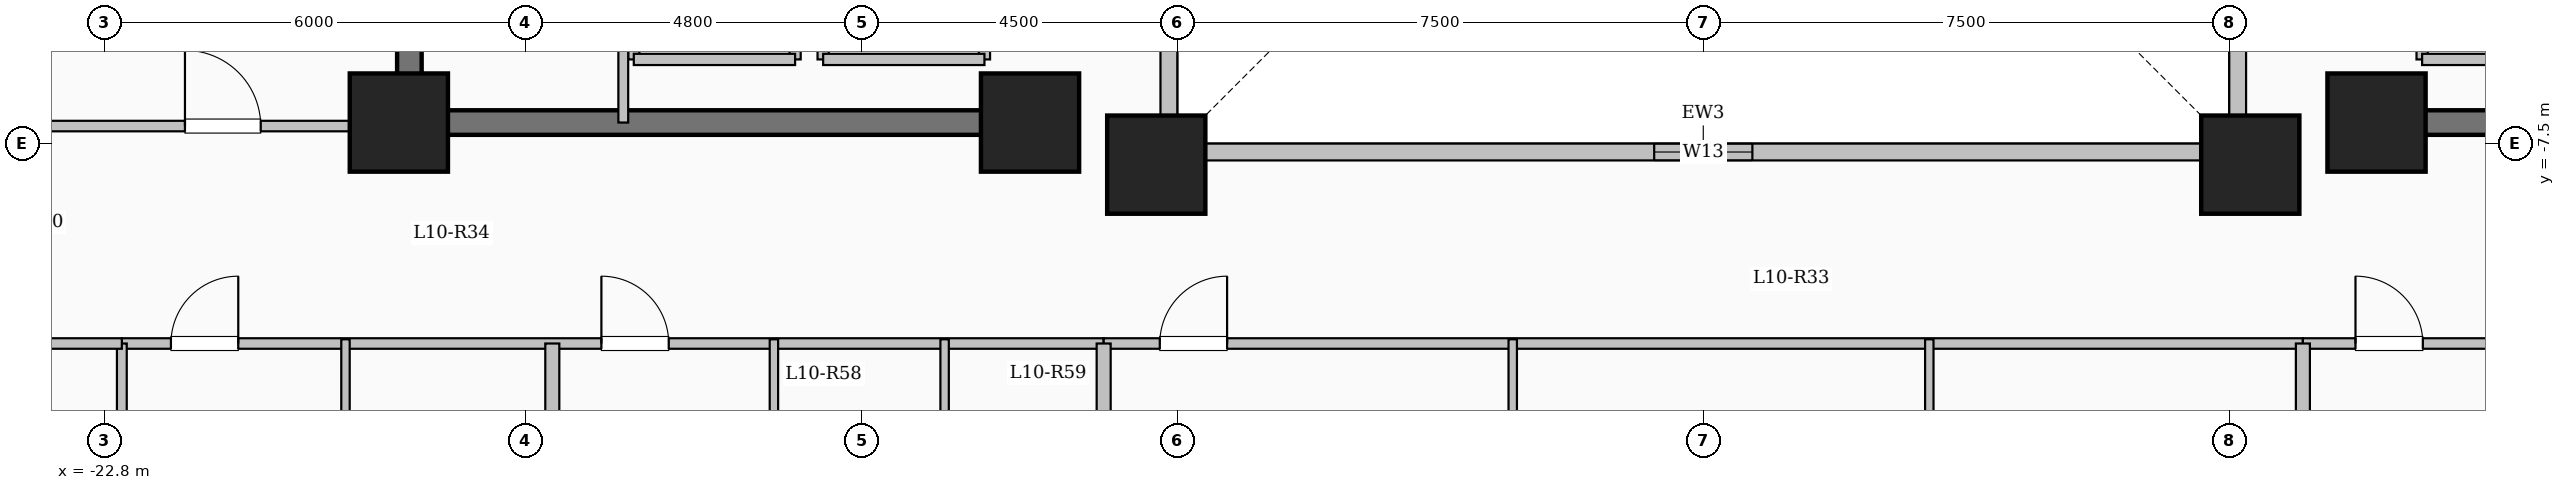
"""IFC4 building model, lengths in metres.
Left out: names, types, materials, properties, quantities, classifications, styles, units other than length and angle.
Written with IfcOpenShell. Run it as: python <this file> out.ifc"""

import sys

from ifc_helpers import new_model, si_unit, direction, frame, frame_2d, origin, origin_2d, place, context, subcontext, project, spatial, rectangle, extrude, element, fill, save


model = new_model("IFC4")
c1 = context("Model", 3, precision=1e-05, world=origin(), true_north=direction((0.0, 1.0)))
c2 = subcontext(c1, "Body", "Model", "MODEL_VIEW")
j1 = project(units=[si_unit("LENGTHUNIT", "METRE"), si_unit("PLANEANGLEUNIT", "RADIAN")], contexts=[c1])
p1 = place(None, origin())
s1 = spatial("IfcSite", under=j1, at=p1, CompositionType="ELEMENT")
p2 = place(p1, origin())
s2 = spatial("IfcBuilding", under=s1, at=p2, CompositionType="ELEMENT")
p3 = place(p2, frame((0.0, 0.0, 40.75)))
s3 = spatial("IfcBuildingStorey", under=s2, at=p3, CompositionType="ELEMENT", Elevation=40.75)
for number, where, z_axis, x_axis in (
    (1, (-7.8, -7.8, 0.0), (0.0, 0.0, 1.0), (1.0, 0.0, 0.0)),
    (2, (7.8, -7.8, 0.0), (0.0, 0.0, 1.0), (1.0, 0.0, 0.0)),
    (3, (-9.6, -7.2, 0.0), (0.0, 0.0, 1.0), (1.0, 0.0, 0.0)),
    (4, (9.6, -7.2, 0.0), (0.0, 0.0, 1.0), (1.0, 0.0, 0.0)),
    (5, (-18.6, -7.2, 0.0), (0.0, 0.0, 1.0), (1.0, 0.0, 0.0)),
):
    element("IfcColumn", number, at=place(p3, frame(where, z_axis=z_axis, x_axis=x_axis)), inside=s3, PredefinedType="COLUMN", context=c2, shape_type="SweptSolid", body=[
        extrude(rectangle(XDim=1.4, YDim=1.4, at=origin_2d()), origin(), (0.0, 0.0, 1.0), 3.35),
    ])
p4 = place(p3, frame((-7.62, -7.62, 0.0), z_axis=(0.0, 0.0, 1.0), x_axis=(1.0, 0.0, 0.0)))
e6 = element("IfcWall", 6, at=p4, inside=s3, PredefinedType="SOLIDWALL", context=c2, shape_type="SweptSolid", body=[
    extrude(rectangle(XDim=15.24, YDim=0.24, at=frame_2d((7.62, 0.0))), origin(), (0.0, 0.0, 1.0), 3.1),
])
p5 = place(p4, frame((6.92, 0.0, 0.95)))
e7 = element("IfcOpeningElement", 7, at=p5, cuts=e6, PredefinedType="OPENING", context=c2, shape_type="SweptSolid", body=[
    extrude(rectangle(XDim=1.4, YDim=1.5, at=frame_2d((0.7, 0.75))), frame((0.0, 0.13, 0.0), z_axis=(0.0, -1.0, 0.0), x_axis=(1.0, 0.0, 0.0)), (0.0, 0.0, 1.0), 0.26),
])
p6 = place(p3, frame((7.62, -7.62, 0.0), z_axis=(0.0, 0.0, 1.0), x_axis=(0.0, 1.0, 0.0)))
e8 = element("IfcWall", 8, at=p6, inside=s3, PredefinedType="SOLIDWALL", context=c2, shape_type="SweptSolid", body=[
    extrude(rectangle(XDim=15.24, YDim=0.24, at=frame_2d((7.62, 0.0))), origin(), (0.0, 0.0, 1.0), 3.1),
])
p7 = place(p6, frame((6.92, 0.0, 0.95)))
e9 = element("IfcOpeningElement", 9, at=p7, cuts=e8, PredefinedType="OPENING", context=c2, shape_type="SweptSolid", body=[
    extrude(rectangle(XDim=1.4, YDim=1.5, at=frame_2d((0.7, 0.75))), frame((0.0, 0.13, 0.0), z_axis=(0.0, -1.0, 0.0), x_axis=(1.0, 0.0, 0.0)), (0.0, 0.0, 1.0), 0.26),
])
p8 = place(p3, frame((-7.62, 7.62, 0.0), z_axis=(0.0, 0.0, 1.0), x_axis=(0.0, -1.0, 0.0)))
e10 = element("IfcWall", 10, at=p8, inside=s3, PredefinedType="SOLIDWALL", context=c2, shape_type="SweptSolid", body=[
    extrude(rectangle(XDim=15.24, YDim=0.24, at=frame_2d((7.62, 0.0))), origin(), (0.0, 0.0, 1.0), 3.1),
])
p9 = place(p8, frame((6.92, 0.0, 0.95)))
e11 = element("IfcOpeningElement", 11, at=p9, cuts=e10, PredefinedType="OPENING", context=c2, shape_type="SweptSolid", body=[
    extrude(rectangle(XDim=1.4, YDim=1.5, at=frame_2d((0.7, 0.75))), frame((0.0, 0.13, 0.0), z_axis=(0.0, -1.0, 0.0), x_axis=(1.0, 0.0, 0.0)), (0.0, 0.0, 1.0), 0.26),
])
p10 = place(p3, frame((-12.55, -6.3, 0.0), z_axis=(0.0, 0.0, 1.0), x_axis=(0.0, 1.0, 0.0)))
e12 = element("IfcWall", 12, at=p10, inside=s3, PredefinedType="SOLIDWALL", context=c2, shape_type="SweptSolid", body=[
    extrude(rectangle(XDim=2.6, YDim=0.16, at=frame_2d((1.3, 0.0))), origin(), (0.0, 0.0, 1.0), 3.1),
])
p11 = place(p3, frame((-10.25, -6.3, 0.0), z_axis=(0.0, 0.0, 1.0), x_axis=(0.0, 1.0, 0.0)))
e13 = element("IfcWall", 13, at=p11, inside=s3, PredefinedType="SOLIDWALL", context=c2, shape_type="SweptSolid", body=[
    extrude(rectangle(XDim=2.6, YDim=0.16, at=frame_2d((1.3, 0.0))), origin(), (0.0, 0.0, 1.0), 3.1),
])
p12 = place(p11, frame((0.75, 0.0, 0.0)))
e14 = element("IfcOpeningElement", 14, at=p12, cuts=e13, PredefinedType="OPENING", context=c2, shape_type="SweptSolid", body=[
    extrude(rectangle(XDim=1.1, YDim=2.15, at=frame_2d((0.55, 1.075))), frame((0.0, 0.09, 0.0), z_axis=(0.0, -1.0, 0.0), x_axis=(1.0, 0.0, 0.0)), (0.0, 0.0, 1.0), 0.18),
])
p13 = place(p3, frame((-12.55, -6.3, 0.0), z_axis=(0.0, 0.0, 1.0), x_axis=(1.0, 0.0, 0.0)))
e15 = element("IfcWall", 15, at=p13, inside=s3, PredefinedType="SOLIDWALL", context=c2, shape_type="SweptSolid", body=[
    extrude(rectangle(XDim=2.3, YDim=0.16, at=frame_2d((1.15, 0.0))), origin(), (0.0, 0.0, 1.0), 3.1),
])
for number, where, z_axis, x_axis in (
    (16, (-15.25, -6.3, 0.0), (0.0, 0.0, 1.0), (0.0, 1.0, 0.0)),
    (17, (-12.95, -6.3, 0.0), (0.0, 0.0, 1.0), (0.0, 1.0, 0.0)),
):
    element("IfcWall", number, at=place(p3, frame(where, z_axis=z_axis, x_axis=x_axis)), inside=s3, PredefinedType="SOLIDWALL", context=c2, shape_type="SweptSolid", body=[
        extrude(rectangle(XDim=2.6, YDim=0.16, at=frame_2d((1.3, 0.0))), origin(), (0.0, 0.0, 1.0), 3.1),
    ])
p14 = place(p3, frame((-15.25, -6.3, 0.0), z_axis=(0.0, 0.0, 1.0), x_axis=(1.0, 0.0, 0.0)))
e18 = element("IfcWall", 18, at=p14, inside=s3, PredefinedType="SOLIDWALL", context=c2, shape_type="SweptSolid", body=[
    extrude(rectangle(XDim=2.3, YDim=0.16, at=frame_2d((1.15, 0.0))), origin(), (0.0, 0.0, 1.0), 3.1),
])
p15 = place(p3, frame((10.25, -6.3, 0.0), z_axis=(0.0, 0.0, 1.0), x_axis=(0.0, 1.0, 0.0)))
e19 = element("IfcWall", 19, at=p15, inside=s3, PredefinedType="SOLIDWALL", context=c2, shape_type="SweptSolid", body=[
    extrude(rectangle(XDim=2.6, YDim=0.16, at=frame_2d((1.3, 0.0))), origin(), (0.0, 0.0, 1.0), 3.1),
])
p16 = place(p3, frame((10.25, -6.3, 0.0), z_axis=(0.0, 0.0, 1.0), x_axis=(1.0, 0.0, 0.0)))
e20 = element("IfcWall", 20, at=p16, inside=s3, PredefinedType="SOLIDWALL", context=c2, shape_type="SweptSolid", body=[
    extrude(rectangle(XDim=2.3, YDim=0.16, at=frame_2d((1.15, 0.0))), origin(), (0.0, 0.0, 1.0), 3.1),
])
p17 = place(p3, frame((-18.45, -7.375, 0.0), z_axis=(0.0, 0.0, 1.0), x_axis=(0.0, 1.0, 0.0)))
e21 = element("IfcWall", 21, at=p17, inside=s3, PredefinedType="SHEAR", context=c2, shape_type="SweptSolid", body=[
    extrude(rectangle(XDim=14.05, YDim=0.35, at=frame_2d((7.025, 0.0))), origin(), (0.0, 0.0, 1.0), 3.35),
])
for number, where, z_axis, x_axis in (
    (22, (-18.625, -7.2, 0.0), (0.0, 0.0, 1.0), (1.0, 0.0, 0.0)),
    (23, (10.075, -7.2, 0.0), (0.0, 0.0, 1.0), (1.0, 0.0, 0.0)),
):
    element("IfcWall", number, at=place(p3, frame(where, z_axis=z_axis, x_axis=x_axis)), inside=s3, PredefinedType="SHEAR", context=c2, shape_type="SweptSolid", body=[
        extrude(rectangle(XDim=8.55, YDim=0.35, at=frame_2d((4.275, 0.0))), origin(), (0.0, 0.0, 1.0), 3.35),
    ])
p18 = place(p3, frame((-15.4, -7.2, 0.0), z_axis=(0.0, 0.0, 1.0), x_axis=(0.0, 1.0, 0.0)))
e24 = element("IfcWall", 24, at=p18, inside=s3, PredefinedType="PARTITIONING", context=c2, shape_type="SweptSolid", body=[
    extrude(rectangle(XDim=10.45, YDim=0.14, at=frame_2d((5.225, 0.0))), origin(), (0.0, 0.0, 1.0), 3.1),
])
p19 = place(p18, frame((9.25, 0.0, 0.0)))
e25 = element("IfcOpeningElement", 25, at=p19, cuts=e24, PredefinedType="OPENING", context=c2, shape_type="SweptSolid", body=[
    extrude(rectangle(XDim=0.9, YDim=2.08, at=frame_2d((0.45, 1.04))), frame((0.0, 0.08, 0.0), z_axis=(0.0, -1.0, 0.0), x_axis=(1.0, 0.0, 0.0)), (0.0, 0.0, 1.0), 0.16),
])
p20 = place(p3, frame((-22.55, -10.35, 0.0), z_axis=(0.0, 0.0, 1.0), x_axis=(1.0, 0.0, 0.0)))
e26 = element("IfcWall", 26, at=p20, inside=s3, PredefinedType="PARTITIONING", context=c2, shape_type="SweptSolid", body=[
    extrude(rectangle(XDim=14.0, YDim=0.15, at=frame_2d((7.0, 0.0))), origin(), (0.0, 0.0, 1.0), 3.1),
])
p21 = place(p20, frame((0.7, 0.0, 0.0)))
e27 = element("IfcOpeningElement", 27, at=p21, cuts=e26, PredefinedType="OPENING", context=c2, shape_type="SweptSolid", body=[
    extrude(rectangle(XDim=0.96, YDim=2.15, at=frame_2d((0.48, 1.075))), frame((0.0, 0.085, 0.0), z_axis=(0.0, -1.0, 0.0), x_axis=(1.0, 0.0, 0.0)), (0.0, 0.0, 1.0), 0.17),
])
p22 = place(p20, frame((6.838, 0.0, 0.0)))
e28 = element("IfcOpeningElement", 28, at=p22, cuts=e26, PredefinedType="OPENING", context=c2, shape_type="SweptSolid", body=[
    extrude(rectangle(XDim=0.96, YDim=2.15, at=frame_2d((0.48, 1.075))), frame((0.0, 0.085, 0.0), z_axis=(0.0, -1.0, 0.0), x_axis=(1.0, 0.0, 0.0)), (0.0, 0.0, 1.0), 0.17),
])
p23 = place(p3, frame((-8.55, -10.35, 0.0), z_axis=(0.0, 0.0, 1.0), x_axis=(1.0, 0.0, 0.0)))
e29 = element("IfcWall", 29, at=p23, inside=s3, PredefinedType="PARTITIONING", context=c2, shape_type="SweptSolid", body=[
    extrude(rectangle(XDim=17.1, YDim=0.15, at=frame_2d((8.55, 0.0))), origin(), (0.0, 0.0, 1.0), 3.1),
])
p24 = place(p23, frame((0.8, 0.0, 0.0)))
e30 = element("IfcOpeningElement", 30, at=p24, cuts=e29, PredefinedType="OPENING", context=c2, shape_type="SweptSolid", body=[
    extrude(rectangle(XDim=0.96, YDim=2.15, at=frame_2d((0.48, 1.075))), frame((0.0, 0.085, 0.0), z_axis=(0.0, -1.0, 0.0), x_axis=(1.0, 0.0, 0.0)), (0.0, 0.0, 1.0), 0.17),
])
p25 = place(p3, frame((8.55, -10.35, 0.0), z_axis=(0.0, 0.0, 1.0), x_axis=(1.0, 0.0, 0.0)))
e31 = element("IfcWall", 31, at=p25, inside=s3, PredefinedType="PARTITIONING", context=c2, shape_type="SweptSolid", body=[
    extrude(rectangle(XDim=14.0, YDim=0.15, at=frame_2d((7.0, 0.0))), origin(), (0.0, 0.0, 1.0), 3.1),
])
p26 = place(p25, frame((0.75, 0.0, 0.0)))
e32 = element("IfcOpeningElement", 32, at=p26, cuts=e31, PredefinedType="OPENING", context=c2, shape_type="SweptSolid", body=[
    extrude(rectangle(XDim=0.96, YDim=2.15, at=frame_2d((0.48, 1.075))), frame((0.0, 0.085, 0.0), z_axis=(0.0, -1.0, 0.0), x_axis=(1.0, 0.0, 0.0)), (0.0, 0.0, 1.0), 0.17),
])
p27 = place(p25, frame((8.283, 0.0, 0.0)))
e33 = element("IfcOpeningElement", 33, at=p27, cuts=e31, PredefinedType="OPENING", context=c2, shape_type="SweptSolid", body=[
    extrude(rectangle(XDim=0.96, YDim=2.15, at=frame_2d((0.48, 1.075))), frame((0.0, 0.085, 0.0), z_axis=(0.0, -1.0, 0.0), x_axis=(1.0, 0.0, 0.0)), (0.0, 0.0, 1.0), 0.17),
])
p28 = place(p3, frame((-16.412, -23.6, 0.0), z_axis=(0.0, 0.0, 1.0), x_axis=(0.0, 1.0, 0.0)))
e34 = element("IfcWall", 34, at=p28, inside=s3, PredefinedType="SOLIDWALL", context=c2, shape_type="SweptSolid", body=[
    extrude(rectangle(XDim=13.25, YDim=0.2, at=frame_2d((6.625, 0.0))), origin(), (0.0, 0.0, 1.0), 3.1),
])
p29 = place(p3, frame((-19.361, -13.51, 0.0), z_axis=(0.0, 0.0, 1.0), x_axis=(0.0, 1.0, 0.0)))
e35 = element("IfcWall", 35, at=p29, inside=s3, PredefinedType="PARTITIONING", context=c2, shape_type="SweptSolid", body=[
    extrude(rectangle(XDim=3.22, YDim=0.12, at=frame_2d((1.61, 0.0))), origin(), (0.0, 0.0, 1.0), 3.1),
])
p30 = place(p29, frame((1.14, 0.0, 0.0)))
e36 = element("IfcOpeningElement", 36, at=p30, cuts=e35, PredefinedType="OPENING", context=c2, shape_type="SweptSolid", body=[
    extrude(rectangle(XDim=0.88, YDim=2.1, at=frame_2d((0.44, 1.05))), frame((0.0, 0.07, 0.0), z_axis=(0.0, -1.0, 0.0), x_axis=(1.0, 0.0, 0.0)), (0.0, 0.0, 1.0), 0.14),
])
p31 = place(p3, frame((-13.252, -23.6, 0.0), z_axis=(0.0, 0.0, 1.0), x_axis=(0.0, 1.0, 0.0)))
e37 = element("IfcWall", 37, at=p31, inside=s3, PredefinedType="PARTITIONING", context=c2, shape_type="SweptSolid", body=[
    extrude(rectangle(XDim=13.31, YDim=0.12, at=frame_2d((6.655, 0.0))), origin(), (0.0, 0.0, 1.0), 3.1),
])
p32 = place(p31, frame((9.485, 0.0, 0.0)))
e38 = element("IfcOpeningElement", 38, at=p32, cuts=e37, PredefinedType="OPENING", context=c2, shape_type="SweptSolid", body=[
    extrude(rectangle(XDim=1.08, YDim=2.15, at=frame_2d((0.54, 1.075))), frame((0.0, 0.07, 0.0), z_axis=(0.0, -1.0, 0.0), x_axis=(1.0, 0.0, 0.0)), (0.0, 0.0, 1.0), 0.14),
])
p33 = place(p3, frame((-10.818, -12.75, 0.0), z_axis=(0.0, 0.0, 1.0), x_axis=(0.0, 1.0, 0.0)))
e39 = element("IfcWall", 39, at=p33, inside=s3, PredefinedType="PARTITIONING", context=c2, shape_type="SweptSolid", body=[
    extrude(rectangle(XDim=2.46, YDim=0.12, at=frame_2d((1.23, 0.0))), origin(), (0.0, 0.0, 1.0), 3.1),
])
for number, where, z_axis, x_axis in (
    (40, (-8.55, -24.204, 0.0), (0.0, 0.0, 1.0), (0.0, 1.0, 0.0)),
    (41, (8.55, -24.204, 0.0), (0.0, 0.0, 1.0), (0.0, 1.0, 0.0)),
):
    element("IfcWall", number, at=place(p3, frame(where, z_axis=z_axis, x_axis=x_axis)), inside=s3, PredefinedType="SOLIDWALL", context=c2, shape_type="SweptSolid", body=[
        extrude(rectangle(XDim=13.854, YDim=0.2, at=frame_2d((6.927, 0.0))), origin(), (0.0, 0.0, 1.0), 3.1),
    ])
p34 = place(p3, frame((-2.717, -25.08, 0.0), z_axis=(0.0, 0.0, 1.0), x_axis=(0.0, 1.0, 0.0)))
e42 = element("IfcWall", 42, at=p34, inside=s3, PredefinedType="PARTITIONING", context=c2, shape_type="SweptSolid", body=[
    extrude(rectangle(XDim=14.79, YDim=0.12, at=frame_2d((7.395, 0.0))), origin(), (0.0, 0.0, 1.0), 3.1),
])
p35 = place(p34, frame((10.455, 0.0, 0.0)))
e43 = element("IfcOpeningElement", 43, at=p35, cuts=e42, PredefinedType="OPENING", context=c2, shape_type="SweptSolid", body=[
    extrude(rectangle(XDim=1.08, YDim=2.15, at=frame_2d((0.54, 1.075))), frame((0.0, 0.07, 0.0), z_axis=(0.0, -1.0, 0.0), x_axis=(1.0, 0.0, 0.0)), (0.0, 0.0, 1.0), 0.14),
])
p36 = place(p3, frame((3.223, -13.26, 0.0), z_axis=(0.0, 0.0, 1.0), x_axis=(0.0, 1.0, 0.0)))
e44 = element("IfcWall", 44, at=p36, inside=s3, PredefinedType="PARTITIONING", context=c2, shape_type="SweptSolid", body=[
    extrude(rectangle(XDim=2.97, YDim=0.12, at=frame_2d((1.485, 0.0))), origin(), (0.0, 0.0, 1.0), 3.1),
])
p37 = place(p3, frame((-28.68, -7.25, 0.0), z_axis=(0.0, 0.0, 1.0), x_axis=(1.0, 0.0, 0.0)))
e45 = element("IfcWall", 45, at=p37, inside=s3, PredefinedType="PARTITIONING", context=c2, shape_type="SweptSolid", body=[
    extrude(rectangle(XDim=10.23, YDim=0.15, at=frame_2d((5.115, 0.0))), origin(), (0.0, 0.0, 1.0), 3.1),
])
p38 = place(p37, frame((7.03, 0.0, 0.0)))
e46 = element("IfcOpeningElement", 46, at=p38, cuts=e45, PredefinedType="OPENING", context=c2, shape_type="SweptSolid", body=[
    extrude(rectangle(XDim=1.08, YDim=2.15, at=frame_2d((0.54, 1.075))), frame((0.0, 0.085, 0.0), z_axis=(0.0, -1.0, 0.0), x_axis=(1.0, 0.0, 0.0)), (0.0, 0.0, 1.0), 0.17),
])
p39 = place(p3, frame((-22.55, -19.05, 0.0), z_axis=(0.0, 0.0, 1.0), x_axis=(0.0, 1.0, 0.0)))
e47 = element("IfcWall", 47, at=p39, inside=s3, PredefinedType="PARTITIONING", context=c2, shape_type="SweptSolid", body=[
    extrude(rectangle(XDim=8.7, YDim=0.14, at=frame_2d((4.35, 0.0))), origin(), (0.0, 0.0, 1.0), 3.1),
])
p40 = place(p3, frame((-28.68, -10.35, 0.0), z_axis=(0.0, 0.0, 1.0), x_axis=(1.0, 0.0, 0.0)))
e48 = element("IfcWall", 48, at=p40, inside=s3, PredefinedType="PARTITIONING", context=c2, shape_type="SweptSolid", body=[
    extrude(rectangle(XDim=6.13, YDim=0.15, at=frame_2d((3.065, 0.0))), origin(), (0.0, 0.0, 1.0), 3.1),
])
p41 = place(p40, frame((2.59, 0.0, 0.0)))
e49 = element("IfcOpeningElement", 49, at=p41, cuts=e48, PredefinedType="OPENING", context=c2, shape_type="SweptSolid", body=[
    extrude(rectangle(XDim=0.95, YDim=2.15, at=frame_2d((0.475, 1.075))), frame((0.0, 0.085, 0.0), z_axis=(0.0, -1.0, 0.0), x_axis=(1.0, 0.0, 0.0)), (0.0, 0.0, 1.0), 0.17),
])
p42 = place(p5, origin())
e50 = element("IfcWindow", 50, at=p42, inside=s3, PartitioningType="SINGLE_PANEL", PredefinedType="WINDOW", context=c2, shape_type="SweptSolid", body=[
    extrude(rectangle(XDim=1.4, YDim=1.5, at=frame_2d((0.7, 0.75))), frame((0.0, 0.03, 0.0), z_axis=(0.0, -1.0, 0.0), x_axis=(1.0, 0.0, 0.0)), (0.0, 0.0, 1.0), 0.06),
])
fill(e7, e50)
p43 = place(p21, origin())
e51 = element("IfcDoor", 51, at=p43, inside=s3, OperationType="SINGLE_SWING_RIGHT", PredefinedType="DOOR", context=c2, shape_type="SweptSolid", body=[
    extrude(rectangle(XDim=0.96, YDim=2.15, at=frame_2d((0.48, 1.075))), frame((0.0, 0.025, 0.0), z_axis=(0.0, -1.0, 0.0), x_axis=(1.0, 0.0, 0.0)), (0.0, 0.0, 1.0), 0.05),
])
fill(e27, e51)
p44 = place(p22, origin())
e52 = element("IfcDoor", 52, at=p44, inside=s3, OperationType="SINGLE_SWING_LEFT", PredefinedType="DOOR", context=c2, shape_type="SweptSolid", body=[
    extrude(rectangle(XDim=0.96, YDim=2.15, at=frame_2d((0.48, 1.075))), frame((0.0, 0.025, 0.0), z_axis=(0.0, -1.0, 0.0), x_axis=(1.0, 0.0, 0.0)), (0.0, 0.0, 1.0), 0.05),
])
fill(e28, e52)
p45 = place(p26, origin())
e53 = element("IfcDoor", 53, at=p45, inside=s3, OperationType="SINGLE_SWING_LEFT", PredefinedType="DOOR", context=c2, shape_type="SweptSolid", body=[
    extrude(rectangle(XDim=0.96, YDim=2.15, at=frame_2d((0.48, 1.075))), frame((0.0, 0.025, 0.0), z_axis=(0.0, -1.0, 0.0), x_axis=(1.0, 0.0, 0.0)), (0.0, 0.0, 1.0), 0.05),
])
fill(e32, e53)
p46 = place(p24, origin())
e54 = element("IfcDoor", 54, at=p46, inside=s3, OperationType="SINGLE_SWING_RIGHT", PredefinedType="DOOR", context=c2, shape_type="SweptSolid", body=[
    extrude(rectangle(XDim=0.96, YDim=2.15, at=frame_2d((0.48, 1.075))), frame((0.0, 0.025, 0.0), z_axis=(0.0, -1.0, 0.0), x_axis=(1.0, 0.0, 0.0)), (0.0, 0.0, 1.0), 0.05),
])
fill(e30, e54)
p47 = place(p38, origin())
e55 = element("IfcDoor", 55, at=p47, inside=s3, OperationType="SINGLE_SWING_LEFT", PredefinedType="DOOR", context=c2, shape_type="SweptSolid", body=[
    extrude(rectangle(XDim=1.08, YDim=2.15, at=frame_2d((0.54, 1.075))), frame((0.0, 0.025, 0.0), z_axis=(0.0, -1.0, 0.0), x_axis=(1.0, 0.0, 0.0)), (0.0, 0.0, 1.0), 0.05),
])
fill(e46, e55)
save(model, sys.argv[1])
